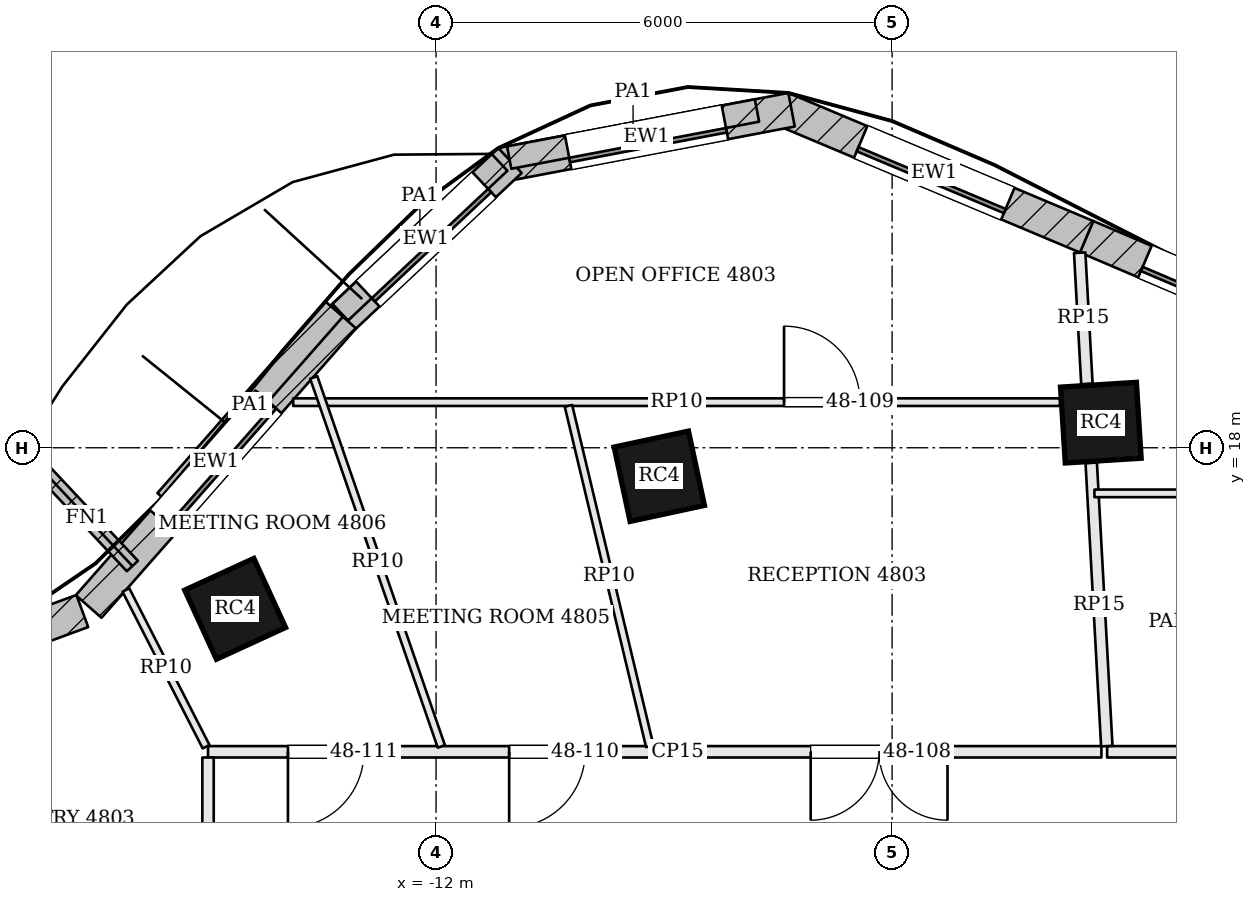
"""IFC4 building model, lengths in metres.
Left out: names, types, materials, properties, quantities, classifications, styles, units other than length and angle.
Written with IfcOpenShell. Run it as: python <this file> out.ifc"""

import sys

from ifc_helpers import new_model, si_unit, direction, frame, frame_2d, origin, origin_2d, place, context, subcontext, project, spatial, rectangle, extrude, element, fill, save


model = new_model("IFC4")
c1 = context("Model", 3, precision=1e-05, world=origin(), true_north=direction((0.0, 1.0)))
c2 = subcontext(c1, "Body", "Model", "MODEL_VIEW")
j1 = project(units=[si_unit("LENGTHUNIT", "METRE"), si_unit("PLANEANGLEUNIT", "RADIAN")], contexts=[c1])
p1 = place(None, origin())
s1 = spatial("IfcSite", under=j1, at=p1, CompositionType="ELEMENT")
p2 = place(p1, origin())
s2 = spatial("IfcBuilding", under=s1, at=p2, CompositionType="ELEMENT")
p3 = place(p2, frame((0.0, 0.0, 197.4)))
s3 = spatial("IfcBuildingStorey", under=s2, at=p3, CompositionType="ELEMENT", Elevation=197.4)
for number, where, z_axis, x_axis in (
    (1, (-3.254, 18.33, 0.0), (0.0, 0.0, 1.0), (-0.998, -0.063, 0.0)),
    (2, (-9.063, 17.625, 0.0), (0.0, 0.0, 1.0), (-0.978, -0.21, 0.0)),
    (3, (-14.643, 15.881, 0.0), (0.0, 0.0, 1.0), (-0.909, -0.417, 0.0)),
):
    element("IfcColumn", number, at=place(p3, frame(where, z_axis=z_axis, x_axis=x_axis)), inside=s3, PredefinedType="COLUMN", context=c2, shape_type="SweptSolid", body=[
        extrude(rectangle(XDim=1.0, YDim=1.0, at=origin_2d()), origin(), (0.0, 0.0, 1.0), 3.9),
    ])
p4 = place(p3, frame((0.026, 19.299, 0.0), z_axis=(0.0, 0.0, 1.0), x_axis=(-0.920040408927, 0.391823488245, 0.0)))
e4 = element("IfcWall", 4, at=p4, inside=s3, PredefinedType="SOLIDWALL", context=c2, shape_type="SweptSolid", body=[
    extrude(rectangle(XDim=3.77, YDim=0.45, at=frame_2d((1.885, 0.0))), origin(), (0.0, 0.0, 1.0), 3.7),
])
p5 = place(p4, frame((0.835, 0.0, 0.9)))
e5 = element("IfcOpeningElement", 5, at=p5, cuts=e4, PredefinedType="OPENING", context=c2, shape_type="SweptSolid", body=[
    extrude(rectangle(XDim=2.1, YDim=2.3, at=frame_2d((1.05, 1.15))), frame((0.0, 0.235, 0.0), z_axis=(0.0, -1.0, 0.0), x_axis=(1.0, 0.0, 0.0)), (0.0, 0.0, 1.0), 0.47),
])
p6 = place(p3, frame((-3.441, 20.776, 0.0), z_axis=(0.0, 0.0, 1.0), x_axis=(-0.921988121387, 0.387218160758, 0.0)))
e6 = element("IfcWall", 6, at=p6, inside=s3, PredefinedType="SOLIDWALL", context=c2, shape_type="SweptSolid", body=[
    extrude(rectangle(XDim=4.347, YDim=0.45, at=frame_2d((2.173, 0.0))), origin(), (0.0, 0.0, 1.0), 3.7),
])
p7 = place(p6, frame((1.123, 0.0, 0.9)))
e7 = element("IfcOpeningElement", 7, at=p7, cuts=e6, PredefinedType="OPENING", context=c2, shape_type="SweptSolid", body=[
    extrude(rectangle(XDim=2.1, YDim=2.3, at=frame_2d((1.05, 1.15))), frame((0.0, 0.235, 0.0), z_axis=(0.0, -1.0, 0.0), x_axis=(1.0, 0.0, 0.0)), (0.0, 0.0, 1.0), 0.47),
])
p8 = place(p3, frame((-7.323, 22.447, 0.0), z_axis=(0.0, 0.0, 1.0), x_axis=(-0.982420993638, -0.18667884524, 0.0)))
e8 = element("IfcWall", 8, at=p8, inside=s3, PredefinedType="SOLIDWALL", context=c2, shape_type="SweptSolid", body=[
    extrude(rectangle(XDim=3.884, YDim=0.45, at=frame_2d((1.942, 0.0))), origin(), (0.0, 0.0, 1.0), 3.7),
])
p9 = place(p8, frame((0.892, 0.0, 0.9)))
e9 = element("IfcOpeningElement", 9, at=p9, cuts=e8, PredefinedType="OPENING", context=c2, shape_type="SweptSolid", body=[
    extrude(rectangle(XDim=2.1, YDim=2.3, at=frame_2d((1.05, 1.15))), frame((0.0, 0.235, 0.0), z_axis=(0.0, -1.0, 0.0), x_axis=(1.0, 0.0, 0.0)), (0.0, 0.0, 1.0), 0.47),
])
p10 = place(p3, frame((-11.027, 21.779, 0.0), z_axis=(0.0, 0.0, 1.0), x_axis=(-0.728871214251, -0.684650825631, 0.0)))
e10 = element("IfcWall", 10, at=p10, inside=s3, PredefinedType="SOLIDWALL", context=c2, shape_type="SweptSolid", body=[
    extrude(rectangle(XDim=3.031, YDim=0.45, at=frame_2d((1.516, 0.0))), origin(), (0.0, 0.0, 1.0), 3.7),
])
p11 = place(p10, frame((0.466, 0.0, 0.9)))
e11 = element("IfcOpeningElement", 11, at=p11, cuts=e10, PredefinedType="OPENING", context=c2, shape_type="SweptSolid", body=[
    extrude(rectangle(XDim=2.1, YDim=2.3, at=frame_2d((1.05, 1.15))), frame((0.0, 0.235, 0.0), z_axis=(0.0, -1.0, 0.0), x_axis=(1.0, 0.0, 0.0)), (0.0, 0.0, 1.0), 0.47),
])
p12 = place(p3, frame((-13.221, 19.719, 0.0), z_axis=(0.0, 0.0, 1.0), x_axis=(-0.660424908916, -0.750892095899, 0.0)))
e12 = element("IfcWall", 12, at=p12, inside=s3, PredefinedType="SOLIDWALL", context=c2, shape_type="SweptSolid", body=[
    extrude(rectangle(XDim=5.071, YDim=0.45, at=frame_2d((2.535, 0.0))), origin(), (0.0, 0.0, 1.0), 3.7),
])
p13 = place(p12, frame((1.485, 0.0, 0.9)))
e13 = element("IfcOpeningElement", 13, at=p13, cuts=e12, PredefinedType="OPENING", context=c2, shape_type="SweptSolid", body=[
    extrude(rectangle(XDim=2.1, YDim=2.3, at=frame_2d((1.05, 1.15))), frame((0.0, 0.235, 0.0), z_axis=(0.0, -1.0, 0.0), x_axis=(1.0, 0.0, 0.0)), (0.0, 0.0, 1.0), 0.47),
])
p14 = place(p3, frame((-16.654, 15.852, 0.0), z_axis=(0.0, 0.0, 1.0), x_axis=(-0.938636568132, -0.344907803572, 0.0)))
e14 = element("IfcWall", 14, at=p14, inside=s3, PredefinedType="SOLIDWALL", context=c2, shape_type="SweptSolid", body=[
    extrude(rectangle(XDim=3.887, YDim=0.45, at=frame_2d((1.944, 0.0))), origin(), (0.0, 0.0, 1.0), 3.7),
])
p15 = place(p14, frame((1.044, 0.0, 0.9)))
e15 = element("IfcOpeningElement", 15, at=p15, cuts=e14, PredefinedType="OPENING", context=c2, shape_type="SweptSolid", body=[
    extrude(rectangle(XDim=1.8, YDim=2.3, at=frame_2d((0.9, 1.15))), frame((0.0, 0.235, 0.0), z_axis=(0.0, -1.0, 0.0), x_axis=(1.0, 0.0, 0.0)), (0.0, 0.0, 1.0), 0.47),
])
p16 = place(p3, frame((-15.995, 16.444, 0.0), z_axis=(0.0, 0.0, 1.0), x_axis=(-0.683852936488, 0.729619874494, 0.0)))
e16 = element("IfcWall", 16, at=p16, inside=s3, PredefinedType="SOLIDWALL", context=c2, shape_type="SweptSolid", body=[
    extrude(rectangle(XDim=1.75, YDim=0.2, at=frame_2d((0.875, 0.0))), origin(), (0.0, 0.0, 1.0), 3.7),
])
p17 = place(p3, frame((-7.778, 22.437, 3.9), z_axis=(0.0, 0.0, 1.0), x_axis=(-0.98241446716, -0.186713188382, 0.0)))
e17 = element("IfcWall", 17, at=p17, inside=s3, PredefinedType="PARAPET", context=c2, shape_type="SweptSolid", body=[
    extrude(rectangle(XDim=3.319, YDim=0.3, at=frame_2d((1.659, 0.0))), origin(), (0.0, 0.0, 1.0), 1.1),
])
p18 = place(p3, frame((-11.164, 21.753, 3.9), z_axis=(0.0, 0.0, 1.0), x_axis=(-0.72886475222, -0.684657704967, 0.0)))
e18 = element("IfcWall", 18, at=p18, inside=s3, PredefinedType="PARAPET", context=c2, shape_type="SweptSolid", body=[
    extrude(rectangle(XDim=2.877, YDim=0.3, at=frame_2d((1.438, 0.0))), origin(), (0.0, 0.0, 1.0), 1.1),
])
p19 = place(p3, frame((-13.339, 19.822, 3.9), z_axis=(0.0, 0.0, 1.0), x_axis=(-0.660445690116, -0.7508738179, 0.0)))
e19 = element("IfcWall", 19, at=p19, inside=s3, PredefinedType="PARAPET", context=c2, shape_type="SweptSolid", body=[
    extrude(rectangle(XDim=3.353, YDim=0.3, at=frame_2d((1.677, 0.0))), origin(), (0.0, 0.0, 1.0), 1.1),
])
p20 = place(p3, frame((12.117, 14.0, 0.0), z_axis=(0.0, 0.0, 1.0), x_axis=(-1.0, 0.0, 0.0)))
e20 = element("IfcWall", 20, at=p20, inside=s3, PredefinedType="PARTITIONING", context=c2, shape_type="SweptSolid", body=[
    extrude(rectangle(XDim=15.289, YDim=0.15, at=frame_2d((7.644, 0.0))), origin(), (0.0, 0.0, 1.0), 3.084),
])
p21 = place(p20, frame((2.0, 0.0, 0.0)))
e21 = element("IfcOpeningElement", 21, at=p21, cuts=e20, PredefinedType="OPENING", context=c2, shape_type="SweptSolid", body=[
    extrude(rectangle(XDim=1.8, YDim=2.1, at=frame_2d((0.9, 1.05))), frame((0.0, 0.085, 0.0), z_axis=(0.0, -1.0, 0.0), x_axis=(1.0, 0.0, 0.0)), (0.0, 0.0, 1.0), 0.17),
])
p22 = place(p20, frame((8.603, 0.0, 0.0)))
e22 = element("IfcOpeningElement", 22, at=p22, cuts=e20, PredefinedType="OPENING", context=c2, shape_type="SweptSolid", body=[
    extrude(rectangle(XDim=1.0, YDim=2.4, at=frame_2d((0.5, 1.2))), frame((0.0, 0.085, 0.0), z_axis=(0.0, -1.0, 0.0), x_axis=(1.0, 0.0, 0.0)), (0.0, 0.0, 1.0), 0.17),
])
p23 = place(p3, frame((-3.532, 20.566, 0.0), z_axis=(0.0, 0.0, 1.0), x_axis=(0.054930375168, -0.998490187175, 0.0)))
e23 = element("IfcWall", 23, at=p23, inside=s3, PredefinedType="PARTITIONING", context=c2, shape_type="SweptSolid", body=[
    extrude(rectangle(XDim=1.729, YDim=0.15, at=frame_2d((0.865, 0.0))), origin(), (0.0, 0.0, 1.0), 3.084),
])
p24 = place(p3, frame((-3.38, 17.801, 0.0), z_axis=(0.0, 0.0, 1.0), x_axis=(0.054890258028, -0.998492393348, 0.0)))
e24 = element("IfcWall", 24, at=p24, inside=s3, PredefinedType="PARTITIONING", context=c2, shape_type="SweptSolid", body=[
    extrude(rectangle(XDim=3.732, YDim=0.15, at=frame_2d((1.866, 0.0))), origin(), (0.0, 0.0, 1.0), 3.084),
])
p25 = place(p3, frame((-3.246, 14.0, 0.0), z_axis=(0.0, 0.0, 1.0), x_axis=(-1.0, 0.0, 0.0)))
e25 = element("IfcWall", 25, at=p25, inside=s3, PredefinedType="PARTITIONING", context=c2, shape_type="SweptSolid", body=[
    extrude(rectangle(XDim=11.754, YDim=0.15, at=frame_2d((5.877, 0.0))), origin(), (0.0, 0.0, 1.0), 3.084),
])
p26 = place(p25, frame((2.025, 0.0, 0.0)))
e26 = element("IfcOpeningElement", 26, at=p26, cuts=e25, PredefinedType="OPENING", context=c2, shape_type="SweptSolid", body=[
    extrude(rectangle(XDim=1.8, YDim=2.1, at=frame_2d((0.9, 1.05))), frame((0.0, 0.085, 0.0), z_axis=(0.0, -1.0, 0.0), x_axis=(1.0, 0.0, 0.0)), (0.0, 0.0, 1.0), 0.17),
])
p27 = place(p25, frame((6.792, 0.0, 0.0)))
e27 = element("IfcOpeningElement", 27, at=p27, cuts=e25, PredefinedType="OPENING", context=c2, shape_type="SweptSolid", body=[
    extrude(rectangle(XDim=1.0, YDim=2.4, at=frame_2d((0.5, 1.2))), frame((0.0, 0.085, 0.0), z_axis=(0.0, -1.0, 0.0), x_axis=(1.0, 0.0, 0.0)), (0.0, 0.0, 1.0), 0.17),
])
p28 = place(p25, frame((9.702, 0.0, 0.0)))
e28 = element("IfcOpeningElement", 28, at=p28, cuts=e25, PredefinedType="OPENING", context=c2, shape_type="SweptSolid", body=[
    extrude(rectangle(XDim=1.0, YDim=2.4, at=frame_2d((0.5, 1.2))), frame((0.0, 0.085, 0.0), z_axis=(0.0, -1.0, 0.0), x_axis=(1.0, 0.0, 0.0)), (0.0, 0.0, 1.0), 0.17),
])
p29 = place(p3, frame((-15.0, 13.925, 0.0), z_axis=(0.0, 0.0, 1.0), x_axis=(0.0, -1.0, 0.0)))
e29 = element("IfcWall", 29, at=p29, inside=s3, PredefinedType="PARTITIONING", context=c2, shape_type="SweptSolid", body=[
    extrude(rectangle(XDim=3.803, YDim=0.15, at=frame_2d((1.902, 0.0))), origin(), (0.0, 0.0, 1.0), 3.084),
])
p30 = place(p29, frame((1.45, 0.0, 0.0)))
e30 = element("IfcOpeningElement", 30, at=p30, cuts=e29, PredefinedType="OPENING", context=c2, shape_type="SweptSolid", body=[
    extrude(rectangle(XDim=1.0, YDim=2.1, at=frame_2d((0.5, 1.05))), frame((0.0, 0.085, 0.0), z_axis=(0.0, -1.0, 0.0), x_axis=(1.0, 0.0, 0.0)), (0.0, 0.0, 1.0), 0.17),
])
p31 = place(p3, frame((-3.338, 17.4, 0.0), z_axis=(0.0, 0.0, 1.0), x_axis=(1.0, 0.0, 0.0)))
e31 = element("IfcWall", 31, at=p31, inside=s3, PredefinedType="PARTITIONING", context=c2, shape_type="SweptSolid", body=[
    extrude(rectangle(XDim=11.163, YDim=0.1, at=frame_2d((5.581, 0.0))), origin(), (0.0, 0.0, 1.0), 3.084),
])
p32 = place(p31, frame((1.7, 0.0, 0.0)))
e32 = element("IfcOpeningElement", 32, at=p32, cuts=e31, PredefinedType="OPENING", context=c2, shape_type="SweptSolid", body=[
    extrude(rectangle(XDim=0.9, YDim=2.1, at=frame_2d((0.45, 1.05))), frame((0.0, 0.06, 0.0), z_axis=(0.0, -1.0, 0.0), x_axis=(1.0, 0.0, 0.0)), (0.0, 0.0, 1.0), 0.12),
])
p33 = place(p3, frame((-13.88, 18.6, 0.0), z_axis=(0.0, 0.0, 1.0), x_axis=(1.0, 0.0, 0.0)))
e33 = element("IfcWall", 33, at=p33, inside=s3, PredefinedType="PARTITIONING", context=c2, shape_type="SweptSolid", body=[
    extrude(rectangle(XDim=10.088, YDim=0.1, at=frame_2d((5.044, 0.0))), origin(), (0.0, 0.0, 1.0), 3.084),
])
p34 = place(p33, frame((6.458, 0.0, 0.0)))
e34 = element("IfcOpeningElement", 34, at=p34, cuts=e33, PredefinedType="OPENING", context=c2, shape_type="SweptSolid", body=[
    extrude(rectangle(XDim=1.0, YDim=2.1, at=frame_2d((0.5, 1.05))), frame((0.0, 0.06, 0.0), z_axis=(0.0, -1.0, 0.0), x_axis=(1.0, 0.0, 0.0)), (0.0, 0.0, 1.0), 0.12),
])
p35 = place(p3, frame((-9.188, 14.073, 0.0), z_axis=(0.0, 0.0, 1.0), x_axis=(-0.23234206236, 0.972634137823, 0.0)))
e35 = element("IfcWall", 35, at=p35, inside=s3, PredefinedType="PARTITIONING", context=c2, shape_type="SweptSolid", body=[
    extrude(rectangle(XDim=4.604, YDim=0.1, at=frame_2d((2.302, 0.0))), origin(), (0.0, 0.0, 1.0), 3.084),
])
p36 = place(p3, frame((-11.931, 14.071, 0.0), z_axis=(0.0, 0.0, 1.0), x_axis=(-0.32676115019, 0.945106952004, 0.0)))
e36 = element("IfcWall", 36, at=p36, inside=s3, PredefinedType="PARTITIONING", context=c2, shape_type="SweptSolid", body=[
    extrude(rectangle(XDim=5.136, YDim=0.1, at=frame_2d((2.568, 0.0))), origin(), (0.0, 0.0, 1.0), 3.084),
])
p37 = place(p3, frame((-15.025, 14.067, 0.0), z_axis=(0.0, 0.0, 1.0), x_axis=(-0.455543812182, 0.890213364977, 0.0)))
e37 = element("IfcWall", 37, at=p37, inside=s3, PredefinedType="PARTITIONING", context=c2, shape_type="SweptSolid", body=[
    extrude(rectangle(XDim=2.316, YDim=0.1, at=frame_2d((1.158, 0.0))), origin(), (0.0, 0.0, 1.0), 3.084),
])
p38 = place(p5, origin())
e38 = element("IfcWindow", 38, at=p38, inside=s3, PartitioningType="SINGLE_PANEL", PredefinedType="WINDOW", context=c2, shape_type="SweptSolid", body=[
    extrude(rectangle(XDim=2.1, YDim=2.3, at=frame_2d((1.05, 1.15))), frame((0.0, 0.135, 0.0), z_axis=(0.0, -1.0, 0.0), x_axis=(1.0, 0.0, 0.0)), (0.0, 0.0, 1.0), 0.06),
])
fill(e5, e38)
p39 = place(p7, origin())
e39 = element("IfcWindow", 39, at=p39, inside=s3, PartitioningType="SINGLE_PANEL", PredefinedType="WINDOW", context=c2, shape_type="SweptSolid", body=[
    extrude(rectangle(XDim=2.1, YDim=2.3, at=frame_2d((1.05, 1.15))), frame((0.0, 0.135, 0.0), z_axis=(0.0, -1.0, 0.0), x_axis=(1.0, 0.0, 0.0)), (0.0, 0.0, 1.0), 0.06),
])
fill(e7, e39)
p40 = place(p9, origin())
e40 = element("IfcWindow", 40, at=p40, inside=s3, PartitioningType="SINGLE_PANEL", PredefinedType="WINDOW", context=c2, shape_type="SweptSolid", body=[
    extrude(rectangle(XDim=2.1, YDim=2.3, at=frame_2d((1.05, 1.15))), frame((0.0, 0.135, 0.0), z_axis=(0.0, -1.0, 0.0), x_axis=(1.0, 0.0, 0.0)), (0.0, 0.0, 1.0), 0.06),
])
fill(e9, e40)
p41 = place(p11, origin())
e41 = element("IfcWindow", 41, at=p41, inside=s3, PartitioningType="SINGLE_PANEL", PredefinedType="WINDOW", context=c2, shape_type="SweptSolid", body=[
    extrude(rectangle(XDim=2.1, YDim=2.3, at=frame_2d((1.05, 1.15))), frame((0.0, 0.135, 0.0), z_axis=(0.0, -1.0, 0.0), x_axis=(1.0, 0.0, 0.0)), (0.0, 0.0, 1.0), 0.06),
])
fill(e11, e41)
p42 = place(p13, origin())
e42 = element("IfcWindow", 42, at=p42, inside=s3, PartitioningType="SINGLE_PANEL", PredefinedType="WINDOW", context=c2, shape_type="SweptSolid", body=[
    extrude(rectangle(XDim=2.1, YDim=2.3, at=frame_2d((1.05, 1.15))), frame((0.0, 0.135, 0.0), z_axis=(0.0, -1.0, 0.0), x_axis=(1.0, 0.0, 0.0)), (0.0, 0.0, 1.0), 0.06),
])
fill(e13, e42)
p43 = place(p26, origin())
e43 = element("IfcDoor", 43, at=p43, inside=s3, OperationType="DOUBLE_DOOR_SINGLE_SWING", PredefinedType="DOOR", context=c2, shape_type="SweptSolid", body=[
    extrude(rectangle(XDim=1.8, YDim=2.1, at=frame_2d((0.9, 1.05))), frame((0.0, 0.025, 0.0), z_axis=(0.0, -1.0, 0.0), x_axis=(1.0, 0.0, 0.0)), (0.0, 0.0, 1.0), 0.05),
])
fill(e26, e43)
p44 = place(p34, origin())
e44 = element("IfcDoor", 44, at=p44, inside=s3, OperationType="SINGLE_SWING_LEFT", PredefinedType="DOOR", context=c2, shape_type="SweptSolid", body=[
    extrude(rectangle(XDim=1.0, YDim=2.1, at=frame_2d((0.5, 1.05))), frame((0.0, 0.025, 0.0), z_axis=(0.0, -1.0, 0.0), x_axis=(1.0, 0.0, 0.0)), (0.0, 0.0, 1.0), 0.05),
])
fill(e34, e44)
p45 = place(p27, origin())
e45 = element("IfcDoor", 45, at=p45, inside=s3, OperationType="SINGLE_SWING_RIGHT", PredefinedType="DOOR", context=c2, shape_type="SweptSolid", body=[
    extrude(rectangle(XDim=1.0, YDim=2.4, at=frame_2d((0.5, 1.2))), frame((0.0, 0.025, 0.0), z_axis=(0.0, -1.0, 0.0), x_axis=(1.0, 0.0, 0.0)), (0.0, 0.0, 1.0), 0.05),
])
fill(e27, e45)
p46 = place(p28, origin())
e46 = element("IfcDoor", 46, at=p46, inside=s3, OperationType="SINGLE_SWING_RIGHT", PredefinedType="DOOR", context=c2, shape_type="SweptSolid", body=[
    extrude(rectangle(XDim=1.0, YDim=2.4, at=frame_2d((0.5, 1.2))), frame((0.0, 0.025, 0.0), z_axis=(0.0, -1.0, 0.0), x_axis=(1.0, 0.0, 0.0)), (0.0, 0.0, 1.0), 0.05),
])
fill(e28, e46)
save(model, sys.argv[1])
